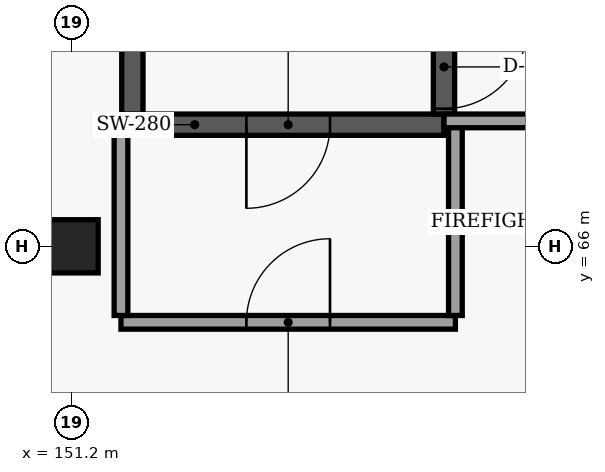
"""IFC4 building model, lengths in metres.
Left out: names, types, materials, properties, quantities, classifications, styles, units other than length and angle.
Written with IfcOpenShell. Run it as: python <this file> out.ifc"""

import sys

from ifc_helpers import new_model, si_unit, direction, frame, frame_2d, origin, origin_2d, place, context, subcontext, project, spatial, rectangle, extrude, element, fill, save


model = new_model("IFC4")
c1 = context("Model", 3, precision=1e-05, world=origin(), true_north=direction((0.0, 1.0)))
c2 = subcontext(c1, "Body", "Model", "MODEL_VIEW")
j1 = project(units=[si_unit("LENGTHUNIT", "METRE"), si_unit("PLANEANGLEUNIT", "RADIAN")], contexts=[c1])
p1 = place(None, origin())
s1 = spatial("IfcSite", under=j1, at=p1, CompositionType="ELEMENT")
p2 = place(p1, origin())
s2 = spatial("IfcBuilding", under=s1, at=p2, CompositionType="ELEMENT")
p3 = place(p2, origin())
s3 = spatial("IfcBuildingStorey", under=s2, at=p3, CompositionType="ELEMENT", Elevation=0.0)
p4 = place(p3, frame((151.2, 66.0, -0.45), z_axis=(0.0, 0.0, 1.0), x_axis=(1.0, 0.0, 0.0)))
e1 = element("IfcColumn", 1, at=p4, inside=s3, PredefinedType="COLUMN", context=c2, shape_type="SweptSolid", body=[
    extrude(rectangle(XDim=0.7, YDim=0.7, at=origin_2d()), origin(), (0.0, 0.0, 1.0), 5.53),
])
p5 = place(p3, frame((156.1, 67.6, -0.45), z_axis=(0.0, 0.0, 1.0), x_axis=(-1.0, 0.0, 0.0)))
e2 = element("IfcWall", 2, at=p5, inside=s3, PredefinedType="SHEAR", context=c2, shape_type="SweptSolid", body=[
    extrude(rectangle(XDim=4.1, YDim=0.28, at=frame_2d((2.05, 0.0))), origin(), (0.0, 0.0, 1.0), 5.53),
])
p6 = place(p5, frame((1.5, 0.0, 0.45)))
e3 = element("IfcOpeningElement", 3, at=p6, cuts=e2, PredefinedType="OPENING", context=c2, shape_type="SweptSolid", body=[
    extrude(rectangle(XDim=1.1, YDim=2.2, at=frame_2d((0.55, 1.1))), frame((0.0, 0.15, 0.0), z_axis=(0.0, -1.0, 0.0), x_axis=(1.0, 0.0, 0.0)), (0.0, 0.0, 1.0), 0.3),
])
p7 = place(p3, frame((152.0, 67.74, -0.45), z_axis=(0.0, 0.0, 1.0), x_axis=(0.0, 1.0, 0.0)))
e4 = element("IfcWall", 4, at=p7, inside=s3, PredefinedType="SHEAR", context=c2, shape_type="SweptSolid", body=[
    extrude(rectangle(XDim=8.72, YDim=0.28, at=frame_2d((4.36, 0.0))), origin(), (0.0, 0.0, 1.0), 5.53),
])
p8 = place(p3, frame((156.1, 76.46, -0.45), z_axis=(0.0, 0.0, 1.0), x_axis=(0.0, -1.0, 0.0)))
e5 = element("IfcWall", 5, at=p8, inside=s3, PredefinedType="SHEAR", context=c2, shape_type="SweptSolid", body=[
    extrude(rectangle(XDim=8.72, YDim=0.28, at=frame_2d((4.36, 0.0))), origin(), (0.0, 0.0, 1.0), 5.53),
])
p9 = place(p8, frame((7.55, 0.0, 0.45)))
e6 = element("IfcOpeningElement", 6, at=p9, cuts=e5, PredefinedType="OPENING", context=c2, shape_type="SweptSolid", body=[
    extrude(rectangle(XDim=1.1, YDim=2.2, at=frame_2d((0.55, 1.1))), frame((0.0, 0.15, 0.0), z_axis=(0.0, -1.0, 0.0), x_axis=(1.0, 0.0, 0.0)), (0.0, 0.0, 1.0), 0.3),
])
p10 = place(p3, frame((151.85, 65.0, 0.0), z_axis=(0.0, 0.0, 1.0), x_axis=(1.0, 0.0, 0.0)))
e7 = element("IfcWall", 7, at=p10, inside=s3, PredefinedType="SOLIDWALL", context=c2, shape_type="SweptSolid", body=[
    extrude(rectangle(XDim=4.4, YDim=0.18, at=frame_2d((2.2, 0.0))), origin(), (0.0, 0.0, 1.0), 5.08),
])
p11 = place(p10, frame((1.65, 0.0, 0.0)))
e8 = element("IfcOpeningElement", 8, at=p11, cuts=e7, PredefinedType="OPENING", context=c2, shape_type="SweptSolid", body=[
    extrude(rectangle(XDim=1.1, YDim=2.2, at=frame_2d((0.55, 1.1))), frame((0.0, 0.1, 0.0), z_axis=(0.0, -1.0, 0.0), x_axis=(1.0, 0.0, 0.0)), (0.0, 0.0, 1.0), 0.2),
])
for number, where, z_axis, x_axis in (
    (9, (151.85, 65.09, 0.0), (0.0, 0.0, 1.0), (0.0, 1.0, 0.0)),
    (10, (156.25, 65.09, 0.0), (0.0, 0.0, 1.0), (0.0, 1.0, 0.0)),
):
    element("IfcWall", number, at=place(p3, frame(where, z_axis=z_axis, x_axis=x_axis)), inside=s3, PredefinedType="SOLIDWALL", context=c2, shape_type="SweptSolid", body=[
        extrude(rectangle(XDim=2.51, YDim=0.18, at=frame_2d((1.255, 0.0))), origin(), (0.0, 0.0, 1.0), 4.387),
    ])
p12 = place(p3, frame((156.1, 67.65, 0.0), z_axis=(0.0, 0.0, 1.0), x_axis=(1.0, 0.0, 0.0)))
e11 = element("IfcWall", 11, at=p12, inside=s3, PredefinedType="SOLIDWALL", context=c2, shape_type="SweptSolid", body=[
    extrude(rectangle(XDim=11.82, YDim=0.18, at=frame_2d((5.91, 0.0))), origin(), (0.0, 0.0, 1.0), 4.536),
])
p13 = place(p12, frame((5.36, 0.0, 0.0)))
e12 = element("IfcOpeningElement", 12, at=p13, cuts=e11, PredefinedType="OPENING", context=c2, shape_type="SweptSolid", body=[
    extrude(rectangle(XDim=1.1, YDim=2.2, at=frame_2d((0.55, 1.1))), frame((0.0, 0.1, 0.0), z_axis=(0.0, -1.0, 0.0), x_axis=(1.0, 0.0, 0.0)), (0.0, 0.0, 1.0), 0.2),
])
p14 = place(p6, origin())
e13 = element("IfcDoor", 13, at=p14, inside=s3, OperationType="SINGLE_SWING_RIGHT", PredefinedType="DOOR", context=c2, shape_type="SweptSolid", body=[
    extrude(rectangle(XDim=1.1, YDim=2.2, at=frame_2d((0.55, 1.1))), frame((0.0, 0.025, 0.0), z_axis=(0.0, -1.0, 0.0), x_axis=(1.0, 0.0, 0.0)), (0.0, 0.0, 1.0), 0.05),
])
fill(e3, e13)
p15 = place(p9, origin())
e14 = element("IfcDoor", 14, at=p15, inside=s3, OperationType="SINGLE_SWING_LEFT", PredefinedType="DOOR", context=c2, shape_type="SweptSolid", body=[
    extrude(rectangle(XDim=1.1, YDim=2.2, at=frame_2d((0.55, 1.1))), frame((0.0, 0.025, 0.0), z_axis=(0.0, -1.0, 0.0), x_axis=(1.0, 0.0, 0.0)), (0.0, 0.0, 1.0), 0.05),
])
fill(e6, e14)
p16 = place(p11, origin())
e15 = element("IfcDoor", 15, at=p16, inside=s3, OperationType="SINGLE_SWING_RIGHT", PredefinedType="DOOR", context=c2, shape_type="SweptSolid", body=[
    extrude(rectangle(XDim=1.1, YDim=2.2, at=frame_2d((0.55, 1.1))), frame((0.0, 0.025, 0.0), z_axis=(0.0, -1.0, 0.0), x_axis=(1.0, 0.0, 0.0)), (0.0, 0.0, 1.0), 0.05),
])
fill(e8, e15)
save(model, sys.argv[1])
